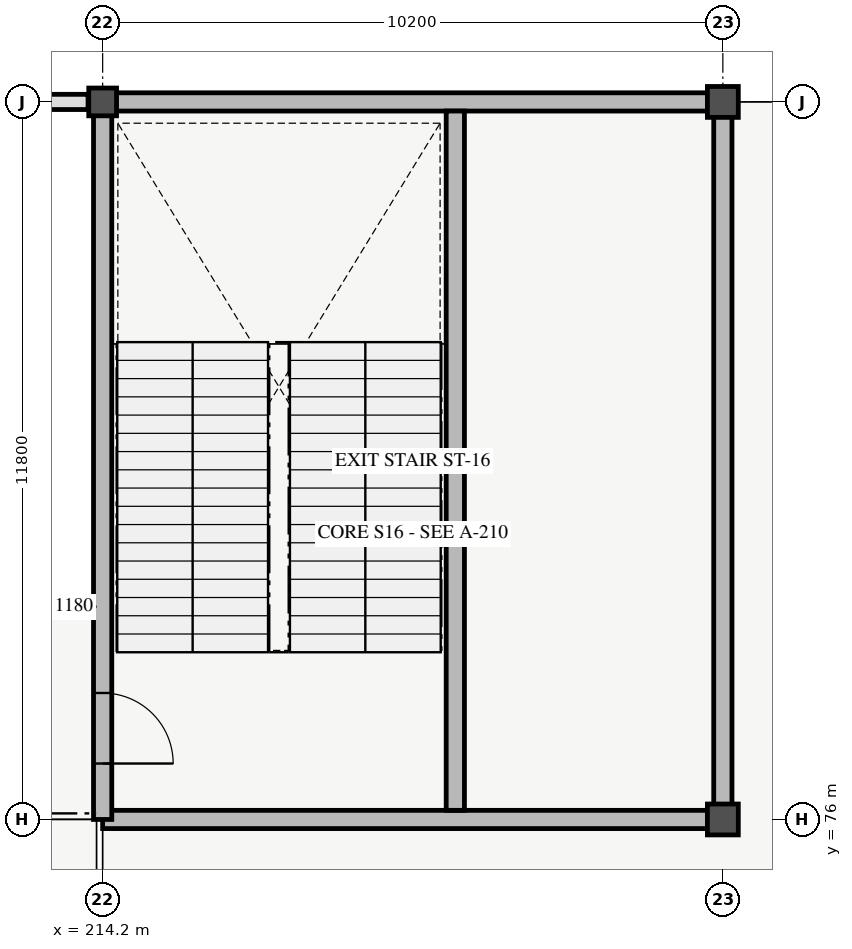
"""IFC4 building model, lengths in metres.
Left out: names, types, materials, properties, quantities, classifications, styles, units other than length and angle.
Written with IfcOpenShell. Run it as: python <this file> out.ifc"""

import sys

from ifc_helpers import new_model, si_unit, direction, frame, frame_2d, origin, origin_2d, place, context, subcontext, project, spatial, rectangle, hollow_circle, extrude, element, fill, save


model = new_model("IFC4")
c1 = context("Model", 3, precision=1e-05, world=origin(), true_north=direction((0.0, 1.0)))
c2 = subcontext(c1, "Body", "Model", "MODEL_VIEW")
j1 = project(units=[si_unit("LENGTHUNIT", "METRE"), si_unit("PLANEANGLEUNIT", "RADIAN")], contexts=[c1])
p1 = place(None, origin())
s1 = spatial("IfcSite", under=j1, at=p1, CompositionType="ELEMENT")
p2 = place(p1, origin())
s2 = spatial("IfcBuilding", under=s1, at=p2, CompositionType="ELEMENT")
p3 = place(p2, frame((0.0, 0.0, 5.4)))
s3 = spatial("IfcBuildingStorey", under=s2, at=p3, CompositionType="ELEMENT", Elevation=5.4)
p4 = place(p3, frame((214.2, 87.8, 0.0), z_axis=(0.0, 0.0, 1.0), x_axis=(1.0, 0.0, 0.0)))
e1 = element("IfcColumn", 1, at=p4, inside=s3, PredefinedType="COLUMN", context=c2, shape_type="SweptSolid", body=[
    extrude(hollow_circle(Radius=0.229, WallThickness=0.02, at=origin_2d()), origin(), (0.0, 0.0, 1.0), 5.4),
])
for number, where, z_axis, x_axis in (
    (2, (224.4, 76.0, 0.0), (0.0, 0.0, 1.0), (1.0, 0.0, 0.0)),
    (3, (224.4, 87.8, 0.0), (0.0, 0.0, 1.0), (1.0, 0.0, 0.0)),
):
    element("IfcColumn", number, at=place(p3, frame(where, z_axis=z_axis, x_axis=x_axis)), inside=s3, PredefinedType="COLUMN", context=c2, shape_type="SweptSolid", body=[
        extrude(hollow_circle(Radius=0.254, WallThickness=0.02, at=origin_2d()), origin(), (0.0, 0.0, 1.0), 5.4),
    ])
p5 = place(p3, frame((204.24, 87.8, 0.0), z_axis=(0.0, 0.0, 1.0), x_axis=(1.0, 0.0, 0.0)))
e4 = element("IfcWall", 4, at=p5, inside=s3, PredefinedType="SOLIDWALL", context=c2, shape_type="SweptSolid", body=[
    extrude(rectangle(XDim=9.72, YDim=0.25, at=frame_2d((4.86, 0.0))), origin(), (0.0, 0.0, 1.0), 4.32),
])
for number, where, z_axis, x_axis in (
    (5, (214.2, 76.0, 0.0), (0.0, 0.0, 1.0), (1.0, 0.0, 0.0)),
    (6, (214.2, 87.8, 0.0), (0.0, 0.0, 1.0), (1.0, 0.0, 0.0)),
):
    element("IfcWall", number, at=place(p3, frame(where, z_axis=z_axis, x_axis=x_axis)), inside=s3, PredefinedType="SHEAR", context=c2, shape_type="SweptSolid", body=[
        extrude(rectangle(XDim=10.2, YDim=0.3, at=frame_2d((5.1, 0.0))), origin(), (0.0, 0.0, 1.0), 5.4),
    ])
p6 = place(p3, frame((214.2, 76.0, 0.0), z_axis=(0.0, 0.0, 1.0), x_axis=(0.0, 1.0, 0.0)))
e7 = element("IfcWall", 7, at=p6, inside=s3, PredefinedType="SHEAR", context=c2, shape_type="SweptSolid", body=[
    extrude(rectangle(XDim=11.8, YDim=0.3, at=frame_2d((5.9, 0.0))), origin(), (0.0, 0.0, 1.0), 5.4),
])
p7 = place(p6, frame((0.92, 0.0, 0.0)))
e8 = element("IfcOpeningElement", 8, at=p7, cuts=e7, PredefinedType="OPENING", context=c2, shape_type="SweptSolid", body=[
    extrude(rectangle(XDim=1.16, YDim=2.2, at=frame_2d((0.58, 1.1))), frame((0.0, 0.16, 0.0), z_axis=(0.0, -1.0, 0.0), x_axis=(1.0, 0.0, 0.0)), (0.0, 0.0, 1.0), 0.32),
])
p8 = place(p3, frame((224.4, 76.0, 0.0), z_axis=(0.0, 0.0, 1.0), x_axis=(0.0, 1.0, 0.0)))
e9 = element("IfcWall", 9, at=p8, inside=s3, PredefinedType="SHEAR", context=c2, shape_type="SweptSolid", body=[
    extrude(rectangle(XDim=11.8, YDim=0.3, at=frame_2d((5.9, 0.0))), origin(), (0.0, 0.0, 1.0), 5.4),
])
p9 = place(p3, frame((220.0, 76.15, 0.0), z_axis=(0.0, 0.0, 1.0), x_axis=(0.0, 1.0, 0.0)))
e10 = element("IfcWall", 10, at=p9, inside=s3, PredefinedType="SHEAR", context=c2, shape_type="SweptSolid", body=[
    extrude(rectangle(XDim=11.5, YDim=0.3, at=frame_2d((5.75, 0.0))), origin(), (0.0, 0.0, 1.0), 5.4),
])
p10 = place(p7, origin())
e11 = element("IfcDoor", 11, at=p10, inside=s3, OperationType="SINGLE_SWING_LEFT", PredefinedType="DOOR", context=c2, shape_type="SweptSolid", body=[
    extrude(rectangle(XDim=1.16, YDim=2.2, at=frame_2d((0.58, 1.1))), frame((0.0, 0.025, 0.0), z_axis=(0.0, -1.0, 0.0), x_axis=(1.0, 0.0, 0.0)), (0.0, 0.0, 1.0), 0.05),
])
fill(e8, e11)
save(model, sys.argv[1])
